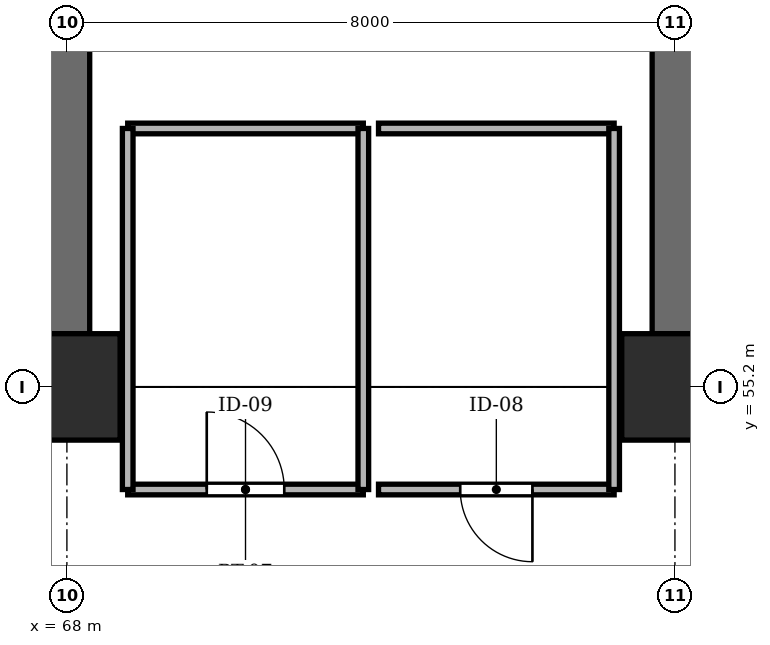
"""IFC4 building model, lengths in metres.
Left out: names, types, materials, properties, quantities, classifications, styles, units other than length and angle.
Written with IfcOpenShell. Run it as: python <this file> out.ifc"""

import sys

from ifc_helpers import new_model, si_unit, direction, frame, frame_2d, origin, origin_2d, place, context, subcontext, project, spatial, rectangle, extrude, element, fill, save


model = new_model("IFC4")
c1 = context("Model", 3, precision=1e-05, world=origin(), true_north=direction((0.0, 1.0)))
c2 = subcontext(c1, "Body", "Model", "MODEL_VIEW")
j1 = project(units=[si_unit("LENGTHUNIT", "METRE"), si_unit("PLANEANGLEUNIT", "RADIAN")], contexts=[c1])
p1 = place(None, origin())
s1 = spatial("IfcSite", under=j1, at=p1, CompositionType="ELEMENT")
p2 = place(p1, origin())
s2 = spatial("IfcBuilding", under=s1, at=p2, CompositionType="ELEMENT")
p3 = place(p2, frame((0.0, 0.0, -4.5)))
s3 = spatial("IfcBuildingStorey", under=s2, at=p3, CompositionType="ELEMENT", Elevation=-4.5)
for number, where, z_axis, x_axis in (
    (1, (68.0, 55.2, -0.32), (0.0, 0.0, 1.0), (1.0, 0.0, 0.0)),
    (2, (76.0, 55.2, -0.32), (0.0, 0.0, 1.0), (1.0, 0.0, 0.0)),
):
    element("IfcColumn", number, at=place(p3, frame(where, z_axis=z_axis, x_axis=x_axis)), inside=s3, PredefinedType="COLUMN", context=c2, shape_type="SweptSolid", body=[
        extrude(rectangle(XDim=1.4, YDim=1.4, at=origin_2d()), origin(), (0.0, 0.0, 1.0), 4.47),
    ])
for number, where, z_axis, x_axis in (
    (3, (68.0, 55.9, 0.0), (0.0, 0.0, 1.0), (0.0, 1.0, 0.0)),
    (4, (76.0, 55.9, 0.0), (0.0, 0.0, 1.0), (0.0, 1.0, 0.0)),
):
    element("IfcWall", number, at=place(p3, frame(where, z_axis=z_axis, x_axis=x_axis)), inside=s3, PredefinedType="SHEAR", context=c2, shape_type="SweptSolid", body=[
        extrude(rectangle(XDim=5.9, YDim=0.6, at=frame_2d((2.95, 0.0))), origin(), (0.0, 0.0, 1.0), 4.15),
    ])
p4 = place(p3, frame((68.8, 53.85, 0.0), z_axis=(0.0, 0.0, 1.0), x_axis=(1.0, 0.0, 0.0)))
e5 = element("IfcWall", 5, at=p4, inside=s3, PredefinedType="PARTITIONING", context=c2, shape_type="SweptSolid", body=[
    extrude(rectangle(XDim=3.1, YDim=0.14, at=frame_2d((1.55, 0.0))), origin(), (0.0, 0.0, 1.0), 3.78),
])
p5 = place(p4, frame((1.04, 0.0, 0.0)))
e6 = element("IfcOpeningElement", 6, at=p5, cuts=e5, PredefinedType="OPENING", context=c2, shape_type="SweptSolid", body=[
    extrude(rectangle(XDim=1.02, YDim=2.1, at=frame_2d((0.51, 1.05))), frame((0.0, 0.082, 0.0), z_axis=(0.0, -1.0, 0.0), x_axis=(1.0, 0.0, 0.0)), (0.0, 0.0, 1.0), 0.164),
])
p6 = place(p3, frame((68.8, 58.6, 0.0), z_axis=(0.0, 0.0, 1.0), x_axis=(1.0, 0.0, 0.0)))
e7 = element("IfcWall", 7, at=p6, inside=s3, PredefinedType="PARTITIONING", context=c2, shape_type="SweptSolid", body=[
    extrude(rectangle(XDim=3.1, YDim=0.14, at=frame_2d((1.55, 0.0))), origin(), (0.0, 0.0, 1.0), 3.78),
])
for number, where, z_axis, x_axis in (
    (8, (68.8, 53.85, 0.0), (0.0, 0.0, 1.0), (0.0, 1.0, 0.0)),
    (9, (71.9, 53.85, 0.0), (0.0, 0.0, 1.0), (0.0, 1.0, 0.0)),
):
    element("IfcWall", number, at=place(p3, frame(where, z_axis=z_axis, x_axis=x_axis)), inside=s3, PredefinedType="PARTITIONING", context=c2, shape_type="SweptSolid", body=[
        extrude(rectangle(XDim=4.75, YDim=0.14, at=frame_2d((2.375, 0.0))), origin(), (0.0, 0.0, 1.0), 3.78),
    ])
p7 = place(p3, frame((72.1, 53.85, 0.0), z_axis=(0.0, 0.0, 1.0), x_axis=(1.0, 0.0, 0.0)))
e10 = element("IfcWall", 10, at=p7, inside=s3, PredefinedType="PARTITIONING", context=c2, shape_type="SweptSolid", body=[
    extrude(rectangle(XDim=3.1, YDim=0.14, at=frame_2d((1.55, 0.0))), origin(), (0.0, 0.0, 1.0), 3.78),
])
p8 = place(p7, frame((1.075, 0.0, 0.0)))
e11 = element("IfcOpeningElement", 11, at=p8, cuts=e10, PredefinedType="OPENING", context=c2, shape_type="SweptSolid", body=[
    extrude(rectangle(XDim=0.95, YDim=2.1, at=frame_2d((0.475, 1.05))), frame((0.0, 0.082, 0.0), z_axis=(0.0, -1.0, 0.0), x_axis=(1.0, 0.0, 0.0)), (0.0, 0.0, 1.0), 0.164),
])
p9 = place(p3, frame((72.1, 58.6, 0.0), z_axis=(0.0, 0.0, 1.0), x_axis=(1.0, 0.0, 0.0)))
e12 = element("IfcWall", 12, at=p9, inside=s3, PredefinedType="PARTITIONING", context=c2, shape_type="SweptSolid", body=[
    extrude(rectangle(XDim=3.1, YDim=0.14, at=frame_2d((1.55, 0.0))), origin(), (0.0, 0.0, 1.0), 3.78),
])
p10 = place(p3, frame((75.2, 53.85, 0.0), z_axis=(0.0, 0.0, 1.0), x_axis=(0.0, 1.0, 0.0)))
e13 = element("IfcWall", 13, at=p10, inside=s3, PredefinedType="PARTITIONING", context=c2, shape_type="SweptSolid", body=[
    extrude(rectangle(XDim=4.75, YDim=0.14, at=frame_2d((2.375, 0.0))), origin(), (0.0, 0.0, 1.0), 3.78),
])
p11 = place(p5, origin())
e14 = element("IfcDoor", 14, at=p11, inside=s3, OperationType="SINGLE_SWING_LEFT", PredefinedType="DOOR", context=c2, shape_type="SweptSolid", body=[
    extrude(rectangle(XDim=1.02, YDim=2.1, at=frame_2d((0.51, 1.05))), frame((0.0, 0.025, 0.0), z_axis=(0.0, -1.0, 0.0), x_axis=(1.0, 0.0, 0.0)), (0.0, 0.0, 1.0), 0.05),
])
fill(e6, e14)
p12 = place(p8, frame((0.95, 0.0, 0.0), z_axis=(0.0, 0.0, 1.0), x_axis=(-1.0, 0.0, 0.0)))
e15 = element("IfcDoor", 15, at=p12, inside=s3, OperationType="SINGLE_SWING_RIGHT", PredefinedType="DOOR", context=c2, shape_type="SweptSolid", body=[
    extrude(rectangle(XDim=0.95, YDim=2.1, at=frame_2d((0.475, 1.05))), frame((0.0, 0.025, 0.0), z_axis=(0.0, -1.0, 0.0), x_axis=(1.0, 0.0, 0.0)), (0.0, 0.0, 1.0), 0.05),
])
fill(e11, e15)
save(model, sys.argv[1])
